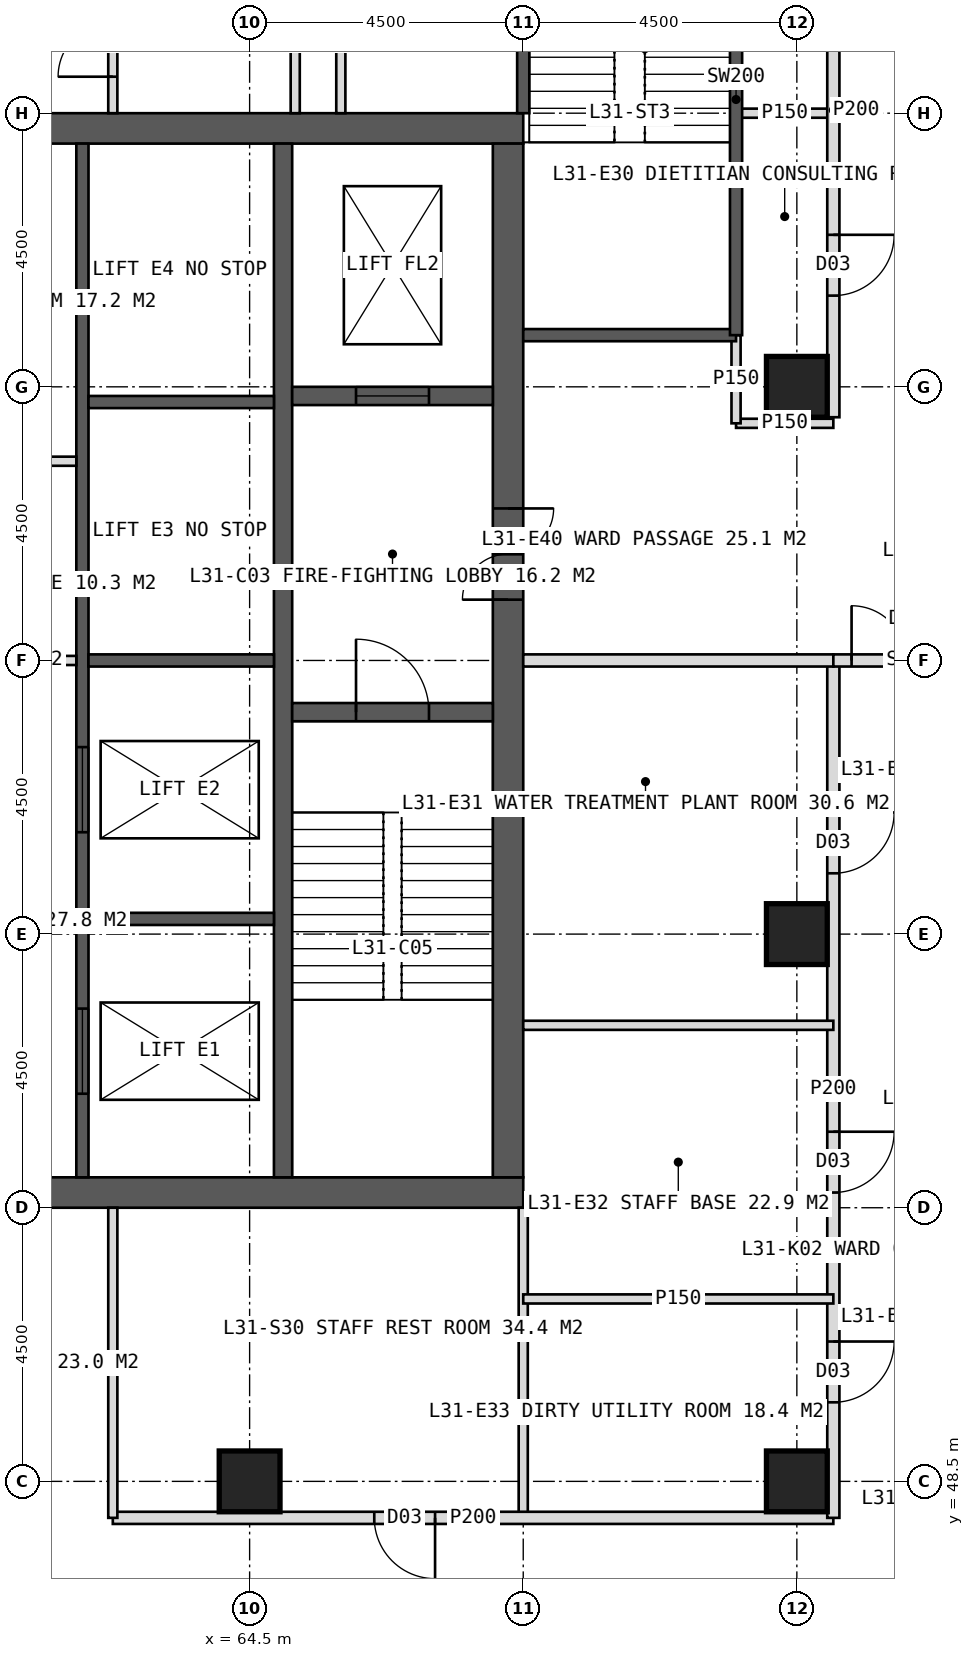
"""IFC4 building model, lengths in metres.
Left out: names, types, materials, properties, quantities, classifications, styles, units other than length and angle.
Written with IfcOpenShell. Run it as: python <this file> out.ifc"""

import sys

from ifc_helpers import new_model, si_unit, direction, frame, frame_2d, origin, origin_2d, place, context, subcontext, project, spatial, rectangle, hollow_rectangle, extrude, element, fill, save


model = new_model("IFC4")
c1 = context("Model", 3, precision=1e-05, world=origin(), true_north=direction((0.0, 1.0)))
c2 = subcontext(c1, "Body", "Model", "MODEL_VIEW")
j1 = project(units=[si_unit("LENGTHUNIT", "METRE"), si_unit("PLANEANGLEUNIT", "RADIAN")], contexts=[c1])
p1 = place(None, origin())
s1 = spatial("IfcSite", under=j1, at=p1, CompositionType="ELEMENT")
p2 = place(p1, origin())
s2 = spatial("IfcBuilding", under=s1, at=p2, CompositionType="ELEMENT")
p3 = place(p2, frame((0.0, 0.0, 132.0)))
s3 = spatial("IfcBuildingStorey", under=s2, at=p3, CompositionType="ELEMENT", Elevation=132.0)
p4 = place(p3, frame((51.0, 70.75, 0.0), z_axis=(0.0, 0.0, 1.0), x_axis=(1.0, 0.0, 0.0)))
e1 = element("IfcWall", 1, at=p4, inside=s3, PredefinedType="SHEAR", context=c2, shape_type="SweptSolid", body=[
    extrude(rectangle(XDim=18.0, YDim=0.5, at=frame_2d((9.0, 0.0))), origin(), (0.0, 0.0, 1.0), 4.0),
])
p5 = place(p4, frame((8.1, 0.0, 0.0)))
e2 = element("IfcOpeningElement", 2, at=p5, cuts=e1, PredefinedType="OPENING", context=c2, shape_type="SweptSolid", body=[
    extrude(rectangle(XDim=1.8, YDim=2.2, at=frame_2d((0.9, 1.1))), frame((0.0, 0.26, 0.0), z_axis=(0.0, -1.0, 0.0), x_axis=(1.0, 0.0, 0.0)), (0.0, 0.0, 1.0), 0.52),
])
p6 = place(p3, frame((51.0, 53.25, 0.0), z_axis=(0.0, 0.0, 1.0), x_axis=(1.0, 0.0, 0.0)))
e3 = element("IfcWall", 3, at=p6, inside=s3, PredefinedType="SHEAR", context=c2, shape_type="SweptSolid", body=[
    extrude(rectangle(XDim=18.0, YDim=0.5, at=frame_2d((9.0, 0.0))), origin(), (0.0, 0.0, 1.0), 4.0),
])
p7 = place(p6, frame((8.1, 0.0, 0.0)))
e4 = element("IfcOpeningElement", 4, at=p7, cuts=e3, PredefinedType="OPENING", context=c2, shape_type="SweptSolid", body=[
    extrude(rectangle(XDim=1.8, YDim=2.2, at=frame_2d((0.9, 1.1))), frame((0.0, 0.26, 0.0), z_axis=(0.0, -1.0, 0.0), x_axis=(1.0, 0.0, 0.0)), (0.0, 0.0, 1.0), 0.52),
])
p8 = place(p3, frame((68.75, 53.5, 0.0), z_axis=(0.0, 0.0, 1.0), x_axis=(0.0, 1.0, 0.0)))
e5 = element("IfcWall", 5, at=p8, inside=s3, PredefinedType="SHEAR", context=c2, shape_type="SweptSolid", body=[
    extrude(rectangle(XDim=17.0, YDim=0.5, at=frame_2d((8.5, 0.0))), origin(), (0.0, 0.0, 1.0), 4.0),
])
p9 = place(p8, frame((9.5, 0.0, 0.0)))
e6 = element("IfcOpeningElement", 6, at=p9, cuts=e5, PredefinedType="OPENING", context=c2, shape_type="SweptSolid", body=[
    extrude(rectangle(XDim=1.5, YDim=2.2, at=frame_2d((0.75, 1.1))), frame((0.0, 0.26, 0.0), z_axis=(0.0, -1.0, 0.0), x_axis=(1.0, 0.0, 0.0)), (0.0, 0.0, 1.0), 0.52),
])
p10 = place(p3, frame((65.05, 53.5, 0.0), z_axis=(0.0, 0.0, 1.0), x_axis=(0.0, 1.0, 0.0)))
e7 = element("IfcWall", 7, at=p10, inside=s3, PredefinedType="SHEAR", context=c2, shape_type="SweptSolid", body=[
    extrude(rectangle(XDim=17.0, YDim=0.3, at=frame_2d((8.5, 0.0))), origin(), (0.0, 0.0, 1.0), 4.0),
])
p11 = place(p3, frame((61.75, 53.5, 0.0), z_axis=(0.0, 0.0, 1.0), x_axis=(0.0, 1.0, 0.0)))
e8 = element("IfcWall", 8, at=p11, inside=s3, PredefinedType="SHEAR", context=c2, shape_type="SweptSolid", body=[
    extrude(rectangle(XDim=17.0, YDim=0.2, at=frame_2d((8.5, 0.0))), origin(), (0.0, 0.0, 1.0), 4.0),
])
p12 = place(p11, frame((1.375, 0.0, 0.0)))
e9 = element("IfcOpeningElement", 9, at=p12, cuts=e8, PredefinedType="OPENING", context=c2, shape_type="SweptSolid", body=[
    extrude(rectangle(XDim=1.4, YDim=2.2, at=frame_2d((0.7, 1.1))), frame((0.0, 0.11, 0.0), z_axis=(0.0, -1.0, 0.0), x_axis=(1.0, 0.0, 0.0)), (0.0, 0.0, 1.0), 0.22),
])
p13 = place(p11, frame((5.675, 0.0, 0.0)))
e10 = element("IfcOpeningElement", 10, at=p13, cuts=e8, PredefinedType="OPENING", context=c2, shape_type="SweptSolid", body=[
    extrude(rectangle(XDim=1.4, YDim=2.2, at=frame_2d((0.7, 1.1))), frame((0.0, 0.11, 0.0), z_axis=(0.0, -1.0, 0.0), x_axis=(1.0, 0.0, 0.0)), (0.0, 0.0, 1.0), 0.22),
])
for number, where, z_axis, x_axis in (
    (11, (61.85, 57.75, 0.0), (0.0, 0.0, 1.0), (1.0, 0.0, 0.0)),
    (12, (61.85, 62.0, 0.0), (0.0, 0.0, 1.0), (1.0, 0.0, 0.0)),
    (13, (61.85, 66.25, 0.0), (0.0, 0.0, 1.0), (1.0, 0.0, 0.0)),
):
    element("IfcWall", number, at=place(p3, frame(where, z_axis=z_axis, x_axis=x_axis)), inside=s3, PredefinedType="SHEAR", context=c2, shape_type="SweptSolid", body=[
        extrude(rectangle(XDim=3.05, YDim=0.2, at=frame_2d((1.525, 0.0))), origin(), (0.0, 0.0, 1.0), 4.0),
    ])
p14 = place(p3, frame((65.2, 61.15, 0.0), z_axis=(0.0, 0.0, 1.0), x_axis=(1.0, 0.0, 0.0)))
e14 = element("IfcWall", 14, at=p14, inside=s3, PredefinedType="SHEAR", context=c2, shape_type="SweptSolid", body=[
    extrude(rectangle(XDim=3.3, YDim=0.3, at=frame_2d((1.65, 0.0))), origin(), (0.0, 0.0, 1.0), 4.0),
])
p15 = place(p14, frame((1.05, 0.0, 0.0)))
e15 = element("IfcOpeningElement", 15, at=p15, cuts=e14, PredefinedType="OPENING", context=c2, shape_type="SweptSolid", body=[
    extrude(rectangle(XDim=1.2, YDim=2.1, at=frame_2d((0.6, 1.05))), frame((0.0, 0.16, 0.0), z_axis=(0.0, -1.0, 0.0), x_axis=(1.0, 0.0, 0.0)), (0.0, 0.0, 1.0), 0.32),
])
p16 = place(p3, frame((65.2, 66.35, 0.0), z_axis=(0.0, 0.0, 1.0), x_axis=(1.0, 0.0, 0.0)))
e16 = element("IfcWall", 16, at=p16, inside=s3, PredefinedType="SHEAR", context=c2, shape_type="SweptSolid", body=[
    extrude(rectangle(XDim=3.3, YDim=0.3, at=frame_2d((1.65, 0.0))), origin(), (0.0, 0.0, 1.0), 4.0),
])
p17 = place(p16, frame((1.05, 0.0, 0.0)))
e17 = element("IfcOpeningElement", 17, at=p17, cuts=e16, PredefinedType="OPENING", context=c2, shape_type="SweptSolid", body=[
    extrude(rectangle(XDim=1.2, YDim=2.2, at=frame_2d((0.6, 1.1))), frame((0.0, 0.16, 0.0), z_axis=(0.0, -1.0, 0.0), x_axis=(1.0, 0.0, 0.0)), (0.0, 0.0, 1.0), 0.32),
])
for number, where, z_axis, x_axis in (
    (18, (73.5, 48.5, 0.0), (0.0, 0.0, 1.0), (1.0, 0.0, 0.0)),
    (19, (64.5, 48.5, 0.0), (0.0, 0.0, 1.0), (1.0, 0.0, 0.0)),
    (20, (73.5, 57.5, 0.0), (0.0, 0.0, 1.0), (1.0, 0.0, 0.0)),
    (21, (73.5, 66.5, 0.0), (0.0, 0.0, 1.0), (1.0, 0.0, 0.0)),
):
    element("IfcColumn", number, at=place(p3, frame(where, z_axis=z_axis, x_axis=x_axis)), inside=s3, PredefinedType="COLUMN", context=c2, shape_type="SweptSolid", body=[
        extrude(hollow_rectangle(XDim=1.0, YDim=1.0, WallThickness=0.1, at=origin_2d()), origin(), (0.0, 0.0, 1.0), 4.0),
    ])
p18 = place(p3, frame((62.25, 71.0, 0.0), z_axis=(0.0, 0.0, 1.0), x_axis=(0.0, 1.0, 0.0)))
e22 = element("IfcWall", 22, at=p18, inside=s3, PredefinedType="PARTITIONING", context=c2, shape_type="SweptSolid", body=[
    extrude(rectangle(XDim=5.1, YDim=0.15, at=frame_2d((2.55, 0.0))), origin(), (0.0, 0.0, 1.0), 3.75),
])
p19 = place(p18, frame((0.6, 0.0, 0.0)))
e23 = element("IfcOpeningElement", 23, at=p19, cuts=e22, PredefinedType="OPENING", context=c2, shape_type="SweptSolid", body=[
    extrude(rectangle(XDim=0.9, YDim=2.1, at=frame_2d((0.45, 1.05))), frame((0.0, 0.085, 0.0), z_axis=(0.0, -1.0, 0.0), x_axis=(1.0, 0.0, 0.0)), (0.0, 0.0, 1.0), 0.17),
])
p20 = place(p3, frame((66.0, 71.0, 0.0), z_axis=(0.0, 0.0, 1.0), x_axis=(0.0, 1.0, 0.0)))
e24 = element("IfcWall", 24, at=p20, inside=s3, PredefinedType="PARTITIONING", context=c2, shape_type="SweptSolid", body=[
    extrude(rectangle(XDim=5.1, YDim=0.15, at=frame_2d((2.55, 0.0))), origin(), (0.0, 0.0, 1.0), 3.75),
])
p21 = place(p3, frame((65.25, 71.0, 0.0), z_axis=(0.0, 0.0, 1.0), x_axis=(0.0, 1.0, 0.0)))
e25 = element("IfcWall", 25, at=p21, inside=s3, PredefinedType="PARTITIONING", context=c2, shape_type="SweptSolid", body=[
    extrude(rectangle(XDim=2.4, YDim=0.15, at=frame_2d((1.2, 0.0))), origin(), (0.0, 0.0, 1.0), 3.75),
])
p22 = place(p3, frame((69.0, 53.0, 0.0), z_axis=(0.0, 0.0, 1.0), x_axis=(0.0, -1.0, 0.0)))
e26 = element("IfcWall", 26, at=p22, inside=s3, PredefinedType="PARTITIONING", context=c2, shape_type="SweptSolid", body=[
    extrude(rectangle(XDim=5.1, YDim=0.15, at=frame_2d((2.55, 0.0))), origin(), (0.0, 0.0, 1.0), 3.75),
])
p23 = place(p3, frame((74.1, 47.9, 0.0), z_axis=(0.0, 0.0, 1.0), x_axis=(-1.0, 0.0, 0.0)))
e27 = element("IfcWall", 27, at=p23, inside=s3, PredefinedType="PARTITIONING", context=c2, shape_type="SweptSolid", body=[
    extrude(rectangle(XDim=11.85, YDim=0.2, at=frame_2d((5.925, 0.0))), origin(), (0.0, 0.0, 1.0), 3.75),
])
p24 = place(p23, frame((6.55, 0.0, 0.0)))
e28 = element("IfcOpeningElement", 28, at=p24, cuts=e27, PredefinedType="OPENING", context=c2, shape_type="SweptSolid", body=[
    extrude(rectangle(XDim=1.0, YDim=2.1, at=frame_2d((0.5, 1.05))), frame((0.0, 0.11, 0.0), z_axis=(0.0, -1.0, 0.0), x_axis=(1.0, 0.0, 0.0)), (0.0, 0.0, 1.0), 0.22),
])
p25 = place(p3, frame((62.25, 53.0, 0.0), z_axis=(0.0, 0.0, 1.0), x_axis=(0.0, -1.0, 0.0)))
e29 = element("IfcWall", 29, at=p25, inside=s3, PredefinedType="PARTITIONING", context=c2, shape_type="SweptSolid", body=[
    extrude(rectangle(XDim=5.1, YDim=0.15, at=frame_2d((2.55, 0.0))), origin(), (0.0, 0.0, 1.0), 3.75),
])
p26 = place(p3, frame((72.5, 71.0, 0.0), z_axis=(0.0, 0.0, 1.0), x_axis=(1.0, 0.0, 0.0)))
e30 = element("IfcWall", 30, at=p26, inside=s3, PredefinedType="PARTITIONING", context=c2, shape_type="SweptSolid", body=[
    extrude(rectangle(XDim=1.6, YDim=0.15, at=frame_2d((0.8, 0.0))), origin(), (0.0, 0.0, 1.0), 3.75),
])
p27 = place(p3, frame((74.1, 76.1, 0.0), z_axis=(0.0, 0.0, 1.0), x_axis=(0.0, -1.0, 0.0)))
e31 = element("IfcWall", 31, at=p27, inside=s3, PredefinedType="PARTITIONING", context=c2, shape_type="SweptSolid", body=[
    extrude(rectangle(XDim=10.1, YDim=0.2, at=frame_2d((5.05, 0.0))), origin(), (0.0, 0.0, 1.0), 3.75),
])
p28 = place(p27, frame((1.2, 0.0, 0.0)))
e32 = element("IfcOpeningElement", 32, at=p28, cuts=e31, PredefinedType="OPENING", context=c2, shape_type="SweptSolid", body=[
    extrude(rectangle(XDim=1.0, YDim=2.1, at=frame_2d((0.5, 1.05))), frame((0.0, 0.11, 0.0), z_axis=(0.0, -1.0, 0.0), x_axis=(1.0, 0.0, 0.0)), (0.0, 0.0, 1.0), 0.22),
])
p29 = place(p27, frame((7.1, 0.0, 0.0)))
e33 = element("IfcOpeningElement", 33, at=p29, cuts=e31, PredefinedType="OPENING", context=c2, shape_type="SweptSolid", body=[
    extrude(rectangle(XDim=1.0, YDim=2.1, at=frame_2d((0.5, 1.05))), frame((0.0, 0.11, 0.0), z_axis=(0.0, -1.0, 0.0), x_axis=(1.0, 0.0, 0.0)), (0.0, 0.0, 1.0), 0.22),
])
p30 = place(p3, frame((74.1, 62.0, 0.0), z_axis=(0.0, 0.0, 1.0), x_axis=(0.0, -1.0, 0.0)))
e34 = element("IfcWall", 34, at=p30, inside=s3, PredefinedType="PARTITIONING", context=c2, shape_type="SweptSolid", body=[
    extrude(rectangle(XDim=14.1, YDim=0.2, at=frame_2d((7.05, 0.0))), origin(), (0.0, 0.0, 1.0), 3.75),
])
p31 = place(p30, frame((2.5, 0.0, 0.0)))
e35 = element("IfcOpeningElement", 35, at=p31, cuts=e34, PredefinedType="OPENING", context=c2, shape_type="SweptSolid", body=[
    extrude(rectangle(XDim=1.0, YDim=2.1, at=frame_2d((0.5, 1.05))), frame((0.0, 0.11, 0.0), z_axis=(0.0, -1.0, 0.0), x_axis=(1.0, 0.0, 0.0)), (0.0, 0.0, 1.0), 0.22),
])
p32 = place(p30, frame((7.75, 0.0, 0.0)))
e36 = element("IfcOpeningElement", 36, at=p32, cuts=e34, PredefinedType="OPENING", context=c2, shape_type="SweptSolid", body=[
    extrude(rectangle(XDim=1.0, YDim=2.1, at=frame_2d((0.5, 1.05))), frame((0.0, 0.11, 0.0), z_axis=(0.0, -1.0, 0.0), x_axis=(1.0, 0.0, 0.0)), (0.0, 0.0, 1.0), 0.22),
])
p33 = place(p30, frame((11.2, 0.0, 0.0)))
e37 = element("IfcOpeningElement", 37, at=p33, cuts=e34, PredefinedType="OPENING", context=c2, shape_type="SweptSolid", body=[
    extrude(rectangle(XDim=1.0, YDim=2.1, at=frame_2d((0.5, 1.05))), frame((0.0, 0.11, 0.0), z_axis=(0.0, -1.0, 0.0), x_axis=(1.0, 0.0, 0.0)), (0.0, 0.0, 1.0), 0.22),
])
p34 = place(p3, frame((72.5, 65.9, 0.0), z_axis=(0.0, 0.0, 1.0), x_axis=(1.0, 0.0, 0.0)))
e38 = element("IfcWall", 38, at=p34, inside=s3, PredefinedType="PARTITIONING", context=c2, shape_type="SweptSolid", body=[
    extrude(rectangle(XDim=1.6, YDim=0.15, at=frame_2d((0.8, 0.0))), origin(), (0.0, 0.0, 1.0), 3.75),
])
p35 = place(p3, frame((69.0, 62.0, 0.0), z_axis=(0.0, 0.0, 1.0), x_axis=(1.0, 0.0, 0.0)))
e39 = element("IfcWall", 39, at=p35, inside=s3, PredefinedType="SOLIDWALL", context=c2, shape_type="SweptSolid", body=[
    extrude(rectangle(XDim=5.1, YDim=0.2, at=frame_2d((2.55, 0.0))), origin(), (0.0, 0.0, 1.0), 2.95),
])
for number, where, z_axis, x_axis in (
    (40, (69.0, 56.0, 0.0), (0.0, 0.0, 1.0), (1.0, 0.0, 0.0)),
    (41, (69.0, 51.5, 0.0), (0.0, 0.0, 1.0), (1.0, 0.0, 0.0)),
):
    element("IfcWall", number, at=place(p3, frame(where, z_axis=z_axis, x_axis=x_axis)), inside=s3, PredefinedType="PARTITIONING", context=c2, shape_type="SweptSolid", body=[
        extrude(rectangle(XDim=5.1, YDim=0.15, at=frame_2d((2.55, 0.0))), origin(), (0.0, 0.0, 1.0), 3.75),
    ])
p36 = place(p3, frame((74.1, 62.0, 0.0), z_axis=(0.0, 0.0, 1.0), x_axis=(1.0, 0.0, 0.0)))
e42 = element("IfcWall", 42, at=p36, inside=s3, PredefinedType="SOLIDWALL", context=c2, shape_type="SweptSolid", body=[
    extrude(rectangle(XDim=2.7, YDim=0.2, at=frame_2d((1.35, 0.0))), origin(), (0.0, 0.0, 1.0), 2.95),
])
p37 = place(p36, frame((0.3, 0.0, 0.0)))
e43 = element("IfcOpeningElement", 43, at=p37, cuts=e42, PredefinedType="OPENING", context=c2, shape_type="SweptSolid", body=[
    extrude(rectangle(XDim=1.8, YDim=2.2, at=frame_2d((0.9, 1.1))), frame((0.0, 0.11, 0.0), z_axis=(0.0, -1.0, 0.0), x_axis=(1.0, 0.0, 0.0)), (0.0, 0.0, 1.0), 0.22),
])
p38 = place(p3, frame((58.35, 62.0, 0.0), z_axis=(0.0, 0.0, 1.0), x_axis=(1.0, 0.0, 0.0)))
e44 = element("IfcWall", 44, at=p38, inside=s3, PredefinedType="PARTITIONING", context=c2, shape_type="SweptSolid", body=[
    extrude(rectangle(XDim=3.3, YDim=0.15, at=frame_2d((1.65, 0.0))), origin(), (0.0, 0.0, 1.0), 3.75),
])
p39 = place(p38, frame((1.15, 0.0, 0.0)))
e45 = element("IfcOpeningElement", 45, at=p39, cuts=e44, PredefinedType="OPENING", context=c2, shape_type="SweptSolid", body=[
    extrude(rectangle(XDim=1.0, YDim=2.1, at=frame_2d((0.5, 1.05))), frame((0.0, 0.085, 0.0), z_axis=(0.0, -1.0, 0.0), x_axis=(1.0, 0.0, 0.0)), (0.0, 0.0, 1.0), 0.17),
])
p40 = place(p3, frame((58.35, 65.277, 0.0), z_axis=(0.0, 0.0, 1.0), x_axis=(1.0, 0.0, 0.0)))
e46 = element("IfcWall", 46, at=p40, inside=s3, PredefinedType="PARTITIONING", context=c2, shape_type="SweptSolid", body=[
    extrude(rectangle(XDim=3.3, YDim=0.15, at=frame_2d((1.65, 0.0))), origin(), (0.0, 0.0, 1.0), 3.75),
])
p41 = place(p3, frame((72.5, 65.9, 0.0), z_axis=(0.0, 0.0, 1.0), x_axis=(0.0, 1.0, 0.0)))
e47 = element("IfcWall", 47, at=p41, inside=s3, PredefinedType="PARTITIONING", context=c2, shape_type="SweptSolid", body=[
    extrude(rectangle(XDim=1.45, YDim=0.15, at=frame_2d((0.725, 0.0))), origin(), (0.0, 0.0, 1.0), 3.75),
])
p42 = place(p3, frame((69.0, 71.0, 0.0), z_axis=(0.0, 0.0, 1.0), x_axis=(0.0, 1.0, 0.0)))
e48 = element("IfcWall", 48, at=p42, inside=s3, PredefinedType="SOLIDWALL", context=c2, shape_type="SweptSolid", body=[
    extrude(rectangle(XDim=4.1, YDim=0.2, at=frame_2d((2.05, 0.0))), origin(), (0.0, 0.0, 1.0), 3.75),
])
p43 = place(p3, frame((69.0, 67.35, 0.0), z_axis=(0.0, 0.0, 1.0), x_axis=(1.0, 0.0, 0.0)))
e49 = element("IfcWall", 49, at=p43, inside=s3, PredefinedType="SOLIDWALL", context=c2, shape_type="SweptSolid", body=[
    extrude(rectangle(XDim=3.5, YDim=0.2, at=frame_2d((1.75, 0.0))), origin(), (0.0, 0.0, 1.0), 3.75),
])
p44 = place(p3, frame((72.5, 67.35, 0.0), z_axis=(0.0, 0.0, 1.0), x_axis=(0.0, 1.0, 0.0)))
e50 = element("IfcWall", 50, at=p44, inside=s3, PredefinedType="SOLIDWALL", context=c2, shape_type="SweptSolid", body=[
    extrude(rectangle(XDim=7.75, YDim=0.2, at=frame_2d((3.875, 0.0))), origin(), (0.0, 0.0, 1.0), 3.75),
])
p45 = place(p19, origin())
e51 = element("IfcDoor", 51, at=p45, inside=s3, OperationType="SINGLE_SWING_LEFT", PredefinedType="DOOR", context=c2, shape_type="SweptSolid", body=[
    extrude(rectangle(XDim=0.9, YDim=2.1, at=frame_2d((0.45, 1.05))), frame((0.0, 0.025, 0.0), z_axis=(0.0, -1.0, 0.0), x_axis=(1.0, 0.0, 0.0)), (0.0, 0.0, 1.0), 0.05),
])
fill(e23, e51)
p46 = place(p24, origin())
e52 = element("IfcDoor", 52, at=p46, inside=s3, OperationType="SINGLE_SWING_LEFT", PredefinedType="DOOR", context=c2, shape_type="SweptSolid", body=[
    extrude(rectangle(XDim=1.0, YDim=2.1, at=frame_2d((0.5, 1.05))), frame((0.0, 0.025, 0.0), z_axis=(0.0, -1.0, 0.0), x_axis=(1.0, 0.0, 0.0)), (0.0, 0.0, 1.0), 0.05),
])
fill(e28, e52)
p47 = place(p29, origin())
e53 = element("IfcDoor", 53, at=p47, inside=s3, OperationType="SINGLE_SWING_LEFT", PredefinedType="DOOR", context=c2, shape_type="SweptSolid", body=[
    extrude(rectangle(XDim=1.0, YDim=2.1, at=frame_2d((0.5, 1.05))), frame((0.0, 0.025, 0.0), z_axis=(0.0, -1.0, 0.0), x_axis=(1.0, 0.0, 0.0)), (0.0, 0.0, 1.0), 0.05),
])
fill(e33, e53)
p48 = place(p31, origin())
e54 = element("IfcDoor", 54, at=p48, inside=s3, OperationType="SINGLE_SWING_LEFT", PredefinedType="DOOR", context=c2, shape_type="SweptSolid", body=[
    extrude(rectangle(XDim=1.0, YDim=2.1, at=frame_2d((0.5, 1.05))), frame((0.0, 0.025, 0.0), z_axis=(0.0, -1.0, 0.0), x_axis=(1.0, 0.0, 0.0)), (0.0, 0.0, 1.0), 0.05),
])
fill(e35, e54)
p49 = place(p32, origin())
e55 = element("IfcDoor", 55, at=p49, inside=s3, OperationType="SINGLE_SWING_LEFT", PredefinedType="DOOR", context=c2, shape_type="SweptSolid", body=[
    extrude(rectangle(XDim=1.0, YDim=2.1, at=frame_2d((0.5, 1.05))), frame((0.0, 0.025, 0.0), z_axis=(0.0, -1.0, 0.0), x_axis=(1.0, 0.0, 0.0)), (0.0, 0.0, 1.0), 0.05),
])
fill(e36, e55)
p50 = place(p33, origin())
e56 = element("IfcDoor", 56, at=p50, inside=s3, OperationType="SINGLE_SWING_LEFT", PredefinedType="DOOR", context=c2, shape_type="SweptSolid", body=[
    extrude(rectangle(XDim=1.0, YDim=2.1, at=frame_2d((0.5, 1.05))), frame((0.0, 0.025, 0.0), z_axis=(0.0, -1.0, 0.0), x_axis=(1.0, 0.0, 0.0)), (0.0, 0.0, 1.0), 0.05),
])
fill(e37, e56)
p51 = place(p37, origin())
e57 = element("IfcDoor", 57, at=p51, inside=s3, OperationType="DOUBLE_DOOR_DOUBLE_SWING", PredefinedType="DOOR", context=c2, shape_type="SweptSolid", body=[
    extrude(rectangle(XDim=1.8, YDim=2.2, at=frame_2d((0.9, 1.1))), frame((0.0, 0.025, 0.0), z_axis=(0.0, -1.0, 0.0), x_axis=(1.0, 0.0, 0.0)), (0.0, 0.0, 1.0), 0.05),
])
fill(e43, e57)
p52 = place(p9, origin())
e58 = element("IfcDoor", 58, at=p52, inside=s3, OperationType="DOUBLE_DOOR_SINGLE_SWING", PredefinedType="DOOR", context=c2, shape_type="SweptSolid", body=[
    extrude(rectangle(XDim=1.5, YDim=2.2, at=frame_2d((0.75, 1.1))), frame((0.0, 0.025, 0.0), z_axis=(0.0, -1.0, 0.0), x_axis=(1.0, 0.0, 0.0)), (0.0, 0.0, 1.0), 0.05),
])
fill(e6, e58)
p53 = place(p15, origin())
e59 = element("IfcDoor", 59, at=p53, inside=s3, OperationType="SINGLE_SWING_LEFT", PredefinedType="DOOR", context=c2, shape_type="SweptSolid", body=[
    extrude(rectangle(XDim=1.2, YDim=2.1, at=frame_2d((0.6, 1.05))), frame((0.0, 0.025, 0.0), z_axis=(0.0, -1.0, 0.0), x_axis=(1.0, 0.0, 0.0)), (0.0, 0.0, 1.0), 0.05),
])
fill(e15, e59)
p54 = place(p17, origin())
e60 = element("IfcDoor", 60, at=p54, inside=s3, OperationType="SLIDING_TO_LEFT", PredefinedType="DOOR", context=c2, shape_type="SweptSolid", body=[
    extrude(rectangle(XDim=1.2, YDim=2.2, at=frame_2d((0.6, 1.1))), frame((0.0, 0.025, 0.0), z_axis=(0.0, -1.0, 0.0), x_axis=(1.0, 0.0, 0.0)), (0.0, 0.0, 1.0), 0.05),
])
fill(e17, e60)
p55 = place(p12, origin())
e61 = element("IfcDoor", 61, at=p55, inside=s3, OperationType="SLIDING_TO_LEFT", PredefinedType="DOOR", context=c2, shape_type="SweptSolid", body=[
    extrude(rectangle(XDim=1.4, YDim=2.2, at=frame_2d((0.7, 1.1))), frame((0.0, 0.025, 0.0), z_axis=(0.0, -1.0, 0.0), x_axis=(1.0, 0.0, 0.0)), (0.0, 0.0, 1.0), 0.05),
])
fill(e9, e61)
p56 = place(p13, origin())
e62 = element("IfcDoor", 62, at=p56, inside=s3, OperationType="SLIDING_TO_LEFT", PredefinedType="DOOR", context=c2, shape_type="SweptSolid", body=[
    extrude(rectangle(XDim=1.4, YDim=2.2, at=frame_2d((0.7, 1.1))), frame((0.0, 0.025, 0.0), z_axis=(0.0, -1.0, 0.0), x_axis=(1.0, 0.0, 0.0)), (0.0, 0.0, 1.0), 0.05),
])
fill(e10, e62)
save(model, sys.argv[1])
